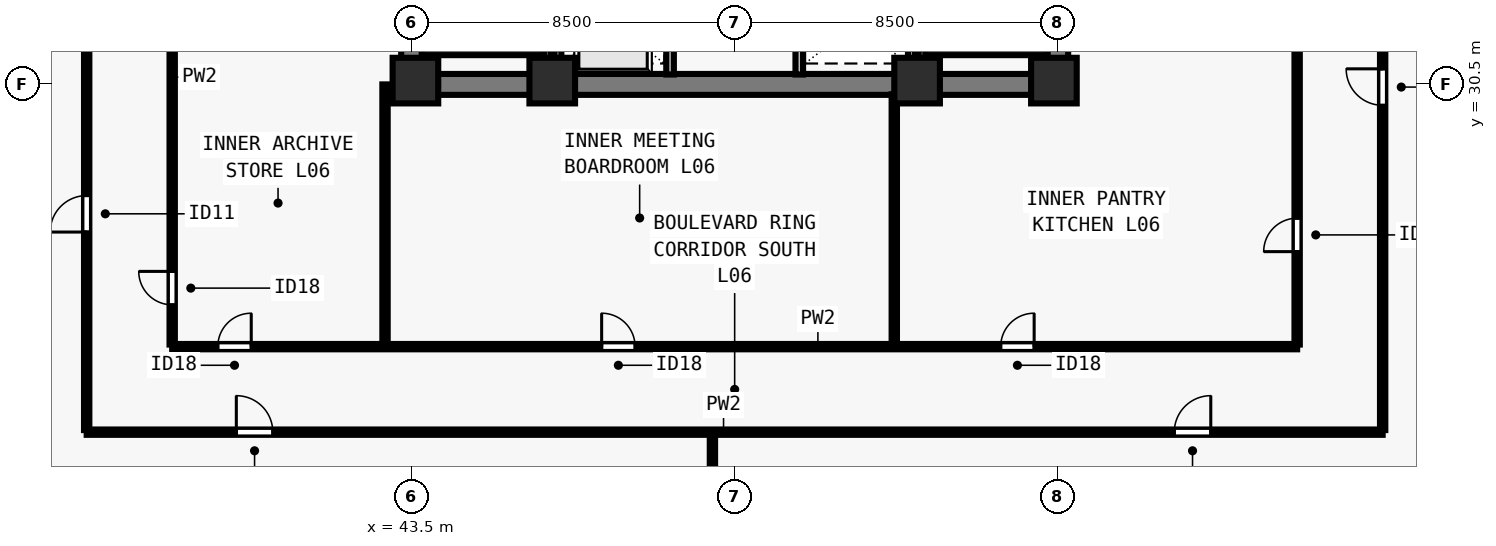
"""IFC4 building model, lengths in metres.
Left out: names, types, materials, properties, quantities, classifications, styles, units other than length and angle.
Written with IfcOpenShell. Run it as: python <this file> out.ifc"""

import sys

from ifc_helpers import new_model, si_unit, direction, frame, frame_2d, origin, origin_2d, place, context, subcontext, project, spatial, rectangle, extrude, element, fill, save


model = new_model("IFC4")
c1 = context("Model", 3, precision=1e-05, world=origin(), true_north=direction((0.0, 1.0)))
c2 = subcontext(c1, "Body", "Model", "MODEL_VIEW")
j1 = project(units=[si_unit("LENGTHUNIT", "METRE"), si_unit("PLANEANGLEUNIT", "RADIAN")], contexts=[c1])
p1 = place(None, origin())
s1 = spatial("IfcSite", under=j1, at=p1, CompositionType="ELEMENT")
p2 = place(p1, origin())
s2 = spatial("IfcBuilding", under=s1, at=p2, CompositionType="ELEMENT")
p3 = place(p2, frame((0.0, 0.0, 27.0)))
s3 = spatial("IfcBuildingStorey", under=s2, at=p3, CompositionType="ELEMENT", Elevation=27.0)
for number, where, z_axis, x_axis in (
    (1, (43.6, 30.6, 0.0), (0.0, 0.0, 1.0), (1.0, 0.0, 0.0)),
    (2, (47.2, 30.6, 0.0), (0.0, 0.0, 1.0), (1.0, 0.0, 0.0)),
    (3, (56.8, 30.6, 0.0), (0.0, 0.0, 1.0), (1.0, 0.0, 0.0)),
    (4, (60.4, 30.6, 0.0), (0.0, 0.0, 1.0), (1.0, 0.0, 0.0)),
):
    element("IfcColumn", number, at=place(p3, frame(where, z_axis=z_axis, x_axis=x_axis)), inside=s3, PredefinedType="COLUMN", context=c2, shape_type="SweptSolid", body=[
        extrude(rectangle(XDim=1.2, YDim=1.2, at=origin_2d()), origin(), (0.0, 0.0, 1.0), 3.5),
    ])
p4 = place(p3, frame((43.225, 30.5, 0.0), z_axis=(0.0, 0.0, 1.0), x_axis=(1.0, 0.0, 0.0)))
e5 = element("IfcWall", 5, at=p4, inside=s3, PredefinedType="SHEAR", context=c2, shape_type="SweptSolid", body=[
    extrude(rectangle(XDim=17.55, YDim=0.55, at=frame_2d((8.775, 0.0))), origin(), (0.0, 0.0, 1.0), 3.28),
])
for number, where, z_axis, x_axis in (
    (6, (43.5, 30.765, 0.0), (0.0, 0.0, 1.0), (0.0, 1.0, 0.0)),
    (7, (60.5, 30.765, 0.0), (0.0, 0.0, 1.0), (0.0, 1.0, 0.0)),
):
    element("IfcWall", number, at=place(p3, frame(where, z_axis=z_axis, x_axis=x_axis)), inside=s3, PredefinedType="SHEAR", context=c2, shape_type="SweptSolid", body=[
        extrude(rectangle(XDim=7.985, YDim=0.55, at=frame_2d((3.993, 0.0))), origin(), (0.0, 0.0, 1.0), 3.28),
    ])
p5 = place(p3, frame((50.3, 30.76, 0.0), z_axis=(0.0, 0.0, 1.0), x_axis=(0.0, 1.0, 0.0)))
e8 = element("IfcWall", 8, at=p5, inside=s3, PredefinedType="SOLIDWALL", context=c2, shape_type="SweptSolid", body=[
    extrude(rectangle(XDim=7.855, YDim=0.2, at=frame_2d((3.927, 0.0))), origin(), (0.0, 0.0, 1.0), 3.28),
])
p6 = place(p5, frame((0.79, 0.0, 0.0)))
e9 = element("IfcOpeningElement", 9, at=p6, cuts=e8, PredefinedType="OPENING", context=c2, shape_type="SweptSolid", body=[
    extrude(rectangle(XDim=1.1, YDim=2.2, at=frame_2d((0.55, 1.1))), frame((0.0, 0.11, 0.0), z_axis=(0.0, -1.0, 0.0), x_axis=(1.0, 0.0, 0.0)), (0.0, 0.0, 1.0), 0.22),
])
p7 = place(p5, frame((3.49, 0.0, 0.0)))
e10 = element("IfcOpeningElement", 10, at=p7, cuts=e8, PredefinedType="OPENING", context=c2, shape_type="SweptSolid", body=[
    extrude(rectangle(XDim=1.1, YDim=2.2, at=frame_2d((0.55, 1.1))), frame((0.0, 0.11, 0.0), z_axis=(0.0, -1.0, 0.0), x_axis=(1.0, 0.0, 0.0)), (0.0, 0.0, 1.0), 0.22),
])
p8 = place(p5, frame((6.19, 0.0, 0.0)))
e11 = element("IfcOpeningElement", 11, at=p8, cuts=e8, PredefinedType="OPENING", context=c2, shape_type="SweptSolid", body=[
    extrude(rectangle(XDim=1.1, YDim=2.2, at=frame_2d((0.55, 1.1))), frame((0.0, 0.11, 0.0), z_axis=(0.0, -1.0, 0.0), x_axis=(1.0, 0.0, 0.0)), (0.0, 0.0, 1.0), 0.22),
])
p9 = place(p3, frame((53.7, 30.76, 0.0), z_axis=(0.0, 0.0, 1.0), x_axis=(0.0, 1.0, 0.0)))
e12 = element("IfcWall", 12, at=p9, inside=s3, PredefinedType="SOLIDWALL", context=c2, shape_type="SweptSolid", body=[
    extrude(rectangle(XDim=7.855, YDim=0.2, at=frame_2d((3.927, 0.0))), origin(), (0.0, 0.0, 1.0), 3.28),
])
for number, where, z_axis, x_axis in (
    (13, (47.35, 30.76, 0.0), (0.0, 0.0, 1.0), (0.0, 1.0, 0.0)),
    (14, (56.65, 30.76, 0.0), (0.0, 0.0, 1.0), (0.0, 1.0, 0.0)),
):
    element("IfcWall", number, at=place(p3, frame(where, z_axis=z_axis, x_axis=x_axis)), inside=s3, PredefinedType="SOLIDWALL", context=c2, shape_type="SweptSolid", body=[
        extrude(rectangle(XDim=7.855, YDim=0.18, at=frame_2d((3.927, 0.0))), origin(), (0.0, 0.0, 1.0), 3.28),
    ])
p10 = place(p3, frame((34.95, 21.35, 0.0), z_axis=(0.0, 0.0, 1.0), x_axis=(1.0, 0.0, 0.0)))
e15 = element("IfcWall", 15, at=p10, inside=s3, PredefinedType="PARTITIONING", context=c2, shape_type="SweptSolid", body=[
    extrude(rectangle(XDim=34.1, YDim=0.14, at=frame_2d((17.05, 0.0))), origin(), (0.0, 0.0, 1.0), 3.28),
])
p11 = place(p10, frame((3.938, 0.0, 0.0)))
e16 = element("IfcOpeningElement", 16, at=p11, cuts=e15, PredefinedType="OPENING", context=c2, shape_type="SweptSolid", body=[
    extrude(rectangle(XDim=0.96, YDim=2.12, at=frame_2d((0.48, 1.06))), frame((0.0, 0.08, 0.0), z_axis=(0.0, -1.0, 0.0), x_axis=(1.0, 0.0, 0.0)), (0.0, 0.0, 1.0), 0.16),
])
p12 = place(p10, frame((28.617, 0.0, 0.0)))
e17 = element("IfcOpeningElement", 17, at=p12, cuts=e15, PredefinedType="OPENING", context=c2, shape_type="SweptSolid", body=[
    extrude(rectangle(XDim=0.96, YDim=2.12, at=frame_2d((0.48, 1.06))), frame((0.0, 0.08, 0.0), z_axis=(0.0, -1.0, 0.0), x_axis=(1.0, 0.0, 0.0)), (0.0, 0.0, 1.0), 0.16),
])
p13 = place(p3, frame((34.95, 21.405, 0.0), z_axis=(0.0, 0.0, 1.0), x_axis=(0.0, 1.0, 0.0)))
e18 = element("IfcWall", 18, at=p13, inside=s3, PredefinedType="PARTITIONING", context=c2, shape_type="SweptSolid", body=[
    extrude(rectangle(XDim=35.19, YDim=0.14, at=frame_2d((17.595, 0.0))), origin(), (0.0, 0.0, 1.0), 3.28),
])
p14 = place(p13, frame((5.21, 0.0, 0.0)))
e19 = element("IfcOpeningElement", 19, at=p14, cuts=e18, PredefinedType="OPENING", context=c2, shape_type="SweptSolid", body=[
    extrude(rectangle(XDim=0.96, YDim=2.12, at=frame_2d((0.48, 1.06))), frame((0.0, 0.08, 0.0), z_axis=(0.0, -1.0, 0.0), x_axis=(1.0, 0.0, 0.0)), (0.0, 0.0, 1.0), 0.16),
])
p15 = place(p13, frame((17.052, 0.0, 0.0)))
e20 = element("IfcOpeningElement", 20, at=p15, cuts=e18, PredefinedType="OPENING", context=c2, shape_type="SweptSolid", body=[
    extrude(rectangle(XDim=0.96, YDim=2.12, at=frame_2d((0.48, 1.06))), frame((0.0, 0.08, 0.0), z_axis=(0.0, -1.0, 0.0), x_axis=(1.0, 0.0, 0.0)), (0.0, 0.0, 1.0), 0.16),
])
p16 = place(p13, frame((28.957, 0.0, 0.0)))
e21 = element("IfcOpeningElement", 21, at=p16, cuts=e18, PredefinedType="OPENING", context=c2, shape_type="SweptSolid", body=[
    extrude(rectangle(XDim=0.96, YDim=2.12, at=frame_2d((0.48, 1.06))), frame((0.0, 0.08, 0.0), z_axis=(0.0, -1.0, 0.0), x_axis=(1.0, 0.0, 0.0)), (0.0, 0.0, 1.0), 0.16),
])
p17 = place(p3, frame((69.05, 21.405, 0.0), z_axis=(0.0, 0.0, 1.0), x_axis=(0.0, 1.0, 0.0)))
e22 = element("IfcWall", 22, at=p17, inside=s3, PredefinedType="PARTITIONING", context=c2, shape_type="SweptSolid", body=[
    extrude(rectangle(XDim=35.19, YDim=0.14, at=frame_2d((17.595, 0.0))), origin(), (0.0, 0.0, 1.0), 3.28),
])
p18 = place(p17, frame((8.545, 0.0, 0.0)))
e23 = element("IfcOpeningElement", 23, at=p18, cuts=e22, PredefinedType="OPENING", context=c2, shape_type="SweptSolid", body=[
    extrude(rectangle(XDim=0.96, YDim=2.12, at=frame_2d((0.48, 1.06))), frame((0.0, 0.08, 0.0), z_axis=(0.0, -1.0, 0.0), x_axis=(1.0, 0.0, 0.0)), (0.0, 0.0, 1.0), 0.16),
])
p19 = place(p17, frame((26.095, 0.0, 0.0)))
e24 = element("IfcOpeningElement", 24, at=p19, cuts=e22, PredefinedType="OPENING", context=c2, shape_type="SweptSolid", body=[
    extrude(rectangle(XDim=0.96, YDim=2.12, at=frame_2d((0.48, 1.06))), frame((0.0, 0.08, 0.0), z_axis=(0.0, -1.0, 0.0), x_axis=(1.0, 0.0, 0.0)), (0.0, 0.0, 1.0), 0.16),
])
p20 = place(p3, frame((37.2, 23.6, 0.0), z_axis=(0.0, 0.0, 1.0), x_axis=(1.0, 0.0, 0.0)))
e25 = element("IfcWall", 25, at=p20, inside=s3, PredefinedType="PARTITIONING", context=c2, shape_type="SweptSolid", body=[
    extrude(rectangle(XDim=29.6, YDim=0.14, at=frame_2d((14.8, 0.0))), origin(), (0.0, 0.0, 1.0), 3.28),
])
p21 = place(p20, frame((1.2, 0.0, 0.0)))
e26 = element("IfcOpeningElement", 26, at=p21, cuts=e25, PredefinedType="OPENING", context=c2, shape_type="SweptSolid", body=[
    extrude(rectangle(XDim=0.88, YDim=2.1, at=frame_2d((0.44, 1.05))), frame((0.0, 0.08, 0.0), z_axis=(0.0, -1.0, 0.0), x_axis=(1.0, 0.0, 0.0)), (0.0, 0.0, 1.0), 0.16),
])
p22 = place(p20, frame((11.3, 0.0, 0.0)))
e27 = element("IfcOpeningElement", 27, at=p22, cuts=e25, PredefinedType="OPENING", context=c2, shape_type="SweptSolid", body=[
    extrude(rectangle(XDim=0.88, YDim=2.1, at=frame_2d((0.44, 1.05))), frame((0.0, 0.08, 0.0), z_axis=(0.0, -1.0, 0.0), x_axis=(1.0, 0.0, 0.0)), (0.0, 0.0, 1.0), 0.16),
])
p23 = place(p20, frame((21.8, 0.0, 0.0)))
e28 = element("IfcOpeningElement", 28, at=p23, cuts=e25, PredefinedType="OPENING", context=c2, shape_type="SweptSolid", body=[
    extrude(rectangle(XDim=0.88, YDim=2.1, at=frame_2d((0.44, 1.05))), frame((0.0, 0.08, 0.0), z_axis=(0.0, -1.0, 0.0), x_axis=(1.0, 0.0, 0.0)), (0.0, 0.0, 1.0), 0.16),
])
p24 = place(p3, frame((37.2, 23.655, 0.0), z_axis=(0.0, 0.0, 1.0), x_axis=(0.0, 1.0, 0.0)))
e29 = element("IfcWall", 29, at=p24, inside=s3, PredefinedType="PARTITIONING", context=c2, shape_type="SweptSolid", body=[
    extrude(rectangle(XDim=15.095, YDim=0.14, at=frame_2d((7.547, 0.0))), origin(), (0.0, 0.0, 1.0), 3.28),
])
p25 = place(p24, frame((1.045, 0.0, 0.0)))
e30 = element("IfcOpeningElement", 30, at=p25, cuts=e29, PredefinedType="OPENING", context=c2, shape_type="SweptSolid", body=[
    extrude(rectangle(XDim=0.88, YDim=2.1, at=frame_2d((0.44, 1.05))), frame((0.0, 0.08, 0.0), z_axis=(0.0, -1.0, 0.0), x_axis=(1.0, 0.0, 0.0)), (0.0, 0.0, 1.0), 0.16),
])
p26 = place(p24, frame((12.145, 0.0, 0.0)))
e31 = element("IfcOpeningElement", 31, at=p26, cuts=e29, PredefinedType="OPENING", context=c2, shape_type="SweptSolid", body=[
    extrude(rectangle(XDim=0.88, YDim=2.1, at=frame_2d((0.44, 1.05))), frame((0.0, 0.08, 0.0), z_axis=(0.0, -1.0, 0.0), x_axis=(1.0, 0.0, 0.0)), (0.0, 0.0, 1.0), 0.16),
])
p27 = place(p3, frame((66.8, 23.655, 0.0), z_axis=(0.0, 0.0, 1.0), x_axis=(0.0, 1.0, 0.0)))
e32 = element("IfcWall", 32, at=p27, inside=s3, PredefinedType="PARTITIONING", context=c2, shape_type="SweptSolid", body=[
    extrude(rectangle(XDim=15.095, YDim=0.14, at=frame_2d((7.547, 0.0))), origin(), (0.0, 0.0, 1.0), 3.28),
])
p28 = place(p27, frame((2.445, 0.0, 0.0)))
e33 = element("IfcOpeningElement", 33, at=p28, cuts=e32, PredefinedType="OPENING", context=c2, shape_type="SweptSolid", body=[
    extrude(rectangle(XDim=0.88, YDim=2.1, at=frame_2d((0.44, 1.05))), frame((0.0, 0.08, 0.0), z_axis=(0.0, -1.0, 0.0), x_axis=(1.0, 0.0, 0.0)), (0.0, 0.0, 1.0), 0.16),
])
p29 = place(p3, frame((42.8, 23.655, 0.0), z_axis=(0.0, 0.0, 1.0), x_axis=(0.0, 1.0, 0.0)))
e34 = element("IfcWall", 34, at=p29, inside=s3, PredefinedType="PARTITIONING", context=c2, shape_type="SweptSolid", body=[
    extrude(rectangle(XDim=6.845, YDim=0.14, at=frame_2d((3.422, 0.0))), origin(), (0.0, 0.0, 1.0), 2.439),
])
p30 = place(p3, frame((56.2, 23.655, 0.0), z_axis=(0.0, 0.0, 1.0), x_axis=(0.0, 1.0, 0.0)))
e35 = element("IfcWall", 35, at=p30, inside=s3, PredefinedType="PARTITIONING", context=c2, shape_type="SweptSolid", body=[
    extrude(rectangle(XDim=6.585, YDim=0.14, at=frame_2d((3.292, 0.0))), origin(), (0.0, 0.0, 1.0), 2.849),
])
p31 = place(p3, frame((51.415, 13.92, 0.0), z_axis=(0.0, 0.0, 1.0), x_axis=(0.0, 1.0, 0.0)))
e36 = element("IfcWall", 36, at=p31, inside=s3, PredefinedType="PARTITIONING", context=c2, shape_type="SweptSolid", body=[
    extrude(rectangle(XDim=7.33, YDim=0.14, at=frame_2d((3.665, 0.0))), origin(), (0.0, 0.0, 1.0), 2.849),
])
p32 = place(p3, frame((43.765, 31.36, 0.0), z_axis=(0.0, 0.0, 1.0), x_axis=(1.0, 0.0, 0.0)))
e37 = element("IfcWall", 37, at=p32, inside=s3, PredefinedType="SOLIDWALL", context=c2, shape_type="SweptSolid", body=[
    extrude(rectangle(XDim=3.23, YDim=0.18, at=frame_2d((1.615, 0.0))), origin(), (0.0, 0.0, 1.0), 3.28),
])
p33 = place(p3, frame((47.07, 38.78, 0.0), z_axis=(0.0, 0.0, 1.0), x_axis=(0.0, -1.0, 0.0)))
e38 = element("IfcWall", 38, at=p33, inside=s3, PredefinedType="SOLIDWALL", context=c2, shape_type="SweptSolid", body=[
    extrude(rectangle(XDim=8.017, YDim=0.18, at=frame_2d((4.009, 0.0))), origin(), (0.0, 0.0, 1.0), 3.28),
])
p34 = place(p3, frame((57.005, 31.36, 0.0), z_axis=(0.0, 0.0, 1.0), x_axis=(1.0, 0.0, 0.0)))
e39 = element("IfcWall", 39, at=p34, inside=s3, PredefinedType="SOLIDWALL", context=c2, shape_type="SweptSolid", body=[
    extrude(rectangle(XDim=3.23, YDim=0.18, at=frame_2d((1.615, 0.0))), origin(), (0.0, 0.0, 1.0), 3.28),
])
p35 = place(p3, frame((56.93, 38.78, 0.0), z_axis=(0.0, 0.0, 1.0), x_axis=(0.0, -1.0, 0.0)))
e40 = element("IfcWall", 40, at=p35, inside=s3, PredefinedType="SOLIDWALL", context=c2, shape_type="SweptSolid", body=[
    extrude(rectangle(XDim=8.017, YDim=0.18, at=frame_2d((4.009, 0.0))), origin(), (0.0, 0.0, 1.0), 3.28),
])
p36 = place(p21, origin())
e41 = element("IfcDoor", 41, at=p36, inside=s3, OperationType="SINGLE_SWING_RIGHT", PredefinedType="DOOR", context=c2, shape_type="SweptSolid", body=[
    extrude(rectangle(XDim=0.88, YDim=2.1, at=frame_2d((0.44, 1.05))), frame((0.0, 0.025, 0.0), z_axis=(0.0, -1.0, 0.0), x_axis=(1.0, 0.0, 0.0)), (0.0, 0.0, 1.0), 0.05),
])
fill(e26, e41)
p37 = place(p22, origin())
e42 = element("IfcDoor", 42, at=p37, inside=s3, OperationType="SINGLE_SWING_LEFT", PredefinedType="DOOR", context=c2, shape_type="SweptSolid", body=[
    extrude(rectangle(XDim=0.88, YDim=2.1, at=frame_2d((0.44, 1.05))), frame((0.0, 0.025, 0.0), z_axis=(0.0, -1.0, 0.0), x_axis=(1.0, 0.0, 0.0)), (0.0, 0.0, 1.0), 0.05),
])
fill(e27, e42)
p38 = place(p23, origin())
e43 = element("IfcDoor", 43, at=p38, inside=s3, OperationType="SINGLE_SWING_RIGHT", PredefinedType="DOOR", context=c2, shape_type="SweptSolid", body=[
    extrude(rectangle(XDim=0.88, YDim=2.1, at=frame_2d((0.44, 1.05))), frame((0.0, 0.025, 0.0), z_axis=(0.0, -1.0, 0.0), x_axis=(1.0, 0.0, 0.0)), (0.0, 0.0, 1.0), 0.05),
])
fill(e28, e43)
p39 = place(p25, origin())
e44 = element("IfcDoor", 44, at=p39, inside=s3, OperationType="SINGLE_SWING_RIGHT", PredefinedType="DOOR", context=c2, shape_type="SweptSolid", body=[
    extrude(rectangle(XDim=0.88, YDim=2.1, at=frame_2d((0.44, 1.05))), frame((0.0, 0.025, 0.0), z_axis=(0.0, -1.0, 0.0), x_axis=(1.0, 0.0, 0.0)), (0.0, 0.0, 1.0), 0.05),
])
fill(e30, e44)
p40 = place(p28, origin())
e45 = element("IfcDoor", 45, at=p40, inside=s3, OperationType="SINGLE_SWING_LEFT", PredefinedType="DOOR", context=c2, shape_type="SweptSolid", body=[
    extrude(rectangle(XDim=0.88, YDim=2.1, at=frame_2d((0.44, 1.05))), frame((0.0, 0.025, 0.0), z_axis=(0.0, -1.0, 0.0), x_axis=(1.0, 0.0, 0.0)), (0.0, 0.0, 1.0), 0.05),
])
fill(e33, e45)
p41 = place(p11, origin())
e46 = element("IfcDoor", 46, at=p41, inside=s3, OperationType="SINGLE_SWING_LEFT", PredefinedType="DOOR", context=c2, shape_type="SweptSolid", body=[
    extrude(rectangle(XDim=0.96, YDim=2.12, at=frame_2d((0.48, 1.06))), frame((0.0, 0.025, 0.0), z_axis=(0.0, -1.0, 0.0), x_axis=(1.0, 0.0, 0.0)), (0.0, 0.0, 1.0), 0.05),
])
fill(e16, e46)
p42 = place(p12, origin())
e47 = element("IfcDoor", 47, at=p42, inside=s3, OperationType="SINGLE_SWING_RIGHT", PredefinedType="DOOR", context=c2, shape_type="SweptSolid", body=[
    extrude(rectangle(XDim=0.96, YDim=2.12, at=frame_2d((0.48, 1.06))), frame((0.0, 0.025, 0.0), z_axis=(0.0, -1.0, 0.0), x_axis=(1.0, 0.0, 0.0)), (0.0, 0.0, 1.0), 0.05),
])
fill(e17, e47)
p43 = place(p14, origin())
e48 = element("IfcDoor", 48, at=p43, inside=s3, OperationType="SINGLE_SWING_LEFT", PredefinedType="DOOR", context=c2, shape_type="SweptSolid", body=[
    extrude(rectangle(XDim=0.96, YDim=2.12, at=frame_2d((0.48, 1.06))), frame((0.0, 0.025, 0.0), z_axis=(0.0, -1.0, 0.0), x_axis=(1.0, 0.0, 0.0)), (0.0, 0.0, 1.0), 0.05),
])
fill(e19, e48)
p44 = place(p18, origin())
e49 = element("IfcDoor", 49, at=p44, inside=s3, OperationType="SINGLE_SWING_RIGHT", PredefinedType="DOOR", context=c2, shape_type="SweptSolid", body=[
    extrude(rectangle(XDim=0.96, YDim=2.12, at=frame_2d((0.48, 1.06))), frame((0.0, 0.025, 0.0), z_axis=(0.0, -1.0, 0.0), x_axis=(1.0, 0.0, 0.0)), (0.0, 0.0, 1.0), 0.05),
])
fill(e23, e49)
save(model, sys.argv[1])
